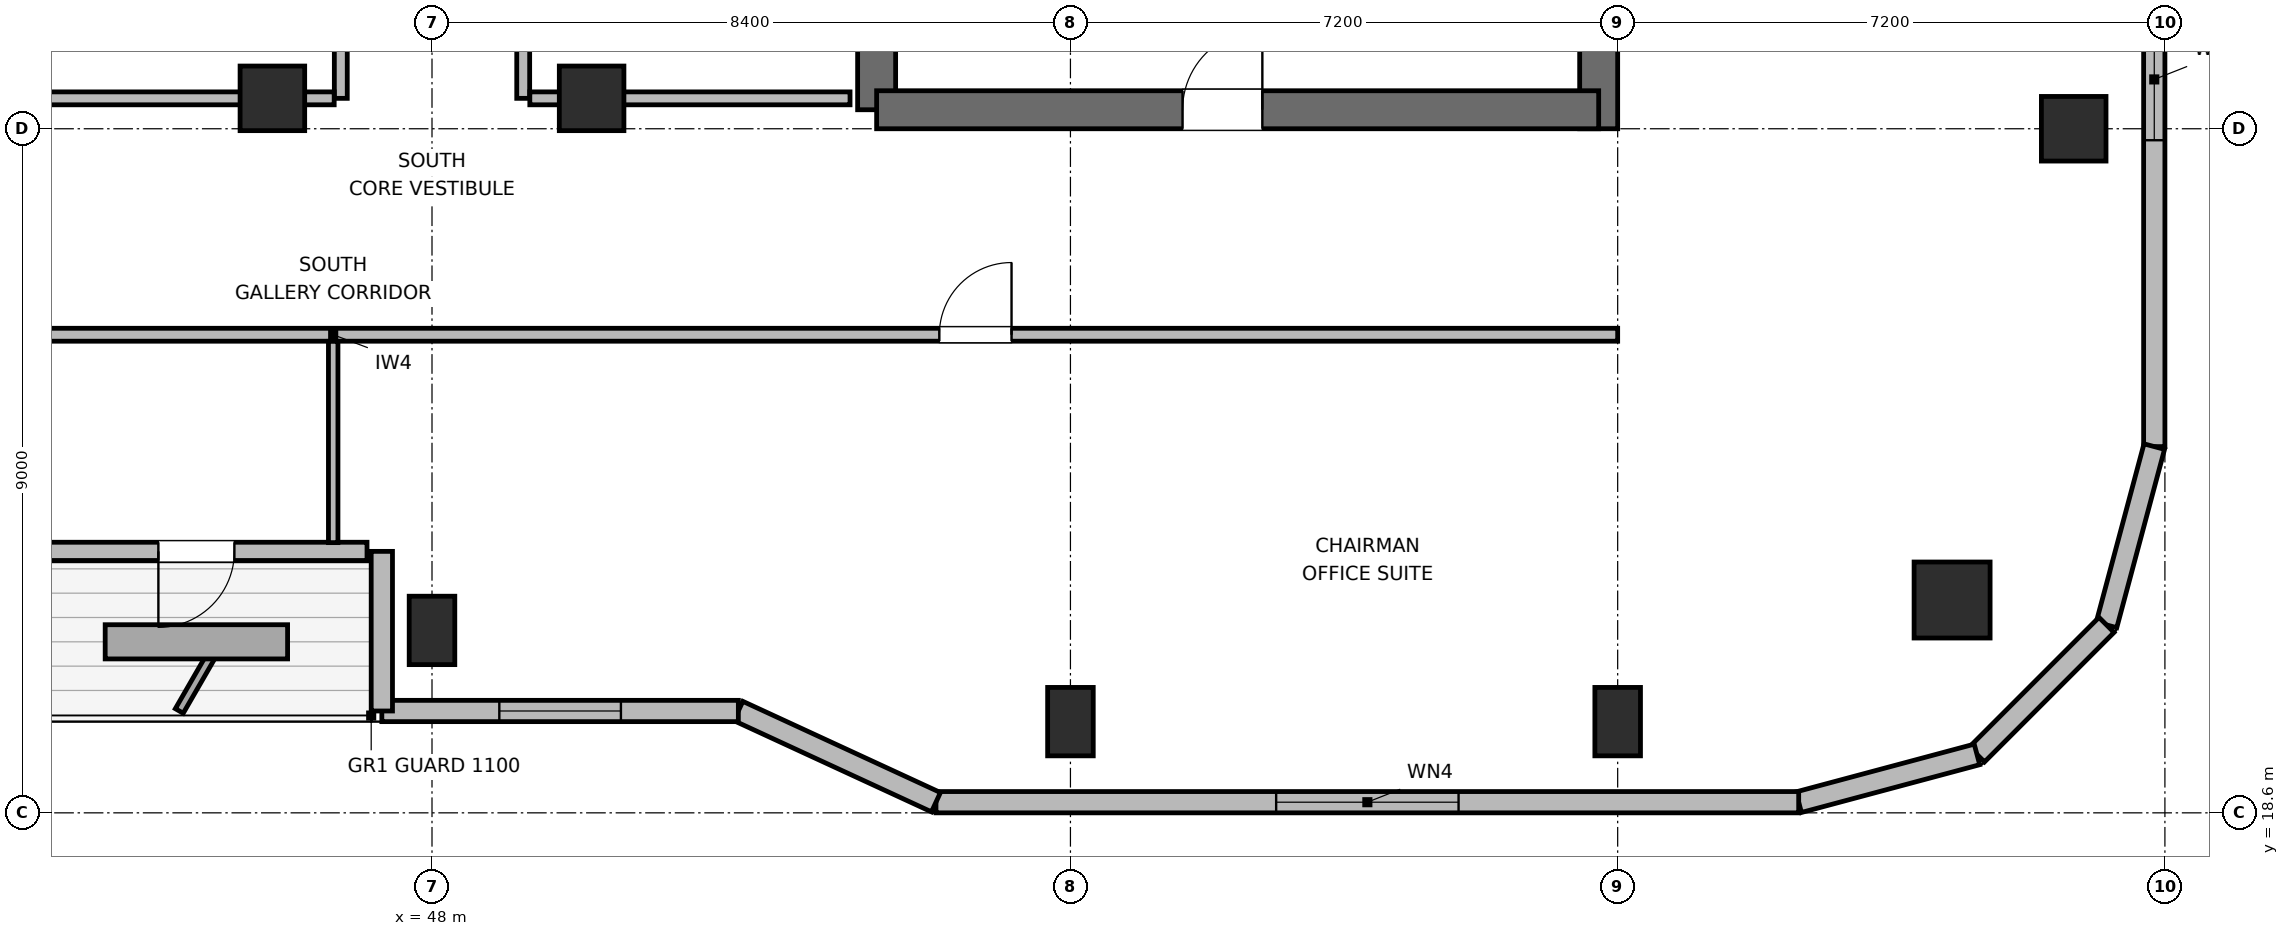
"""IFC4 building model, lengths in metres.
Left out: names, types, materials, properties, quantities, classifications, styles, units other than length and angle.
Written with IfcOpenShell. Run it as: python <this file> out.ifc"""

import sys

from ifc_helpers import new_model, si_unit, direction, frame, frame_2d, origin, origin_2d, place, context, subcontext, project, spatial, rectangle, circle, extrude, element, fill, save


model = new_model("IFC4")
c1 = context("Model", 3, precision=1e-05, world=origin(), true_north=direction((0.0, 1.0)))
c2 = subcontext(c1, "Body", "Model", "MODEL_VIEW")
j1 = project(units=[si_unit("LENGTHUNIT", "METRE"), si_unit("PLANEANGLEUNIT", "RADIAN")], contexts=[c1])
p1 = place(None, origin())
s1 = spatial("IfcSite", under=j1, at=p1, CompositionType="ELEMENT")
p2 = place(p1, origin())
s2 = spatial("IfcBuilding", under=s1, at=p2, CompositionType="ELEMENT")
p3 = place(p2, frame((0.0, 0.0, 342.0)))
s3 = spatial("IfcBuildingStorey", under=s2, at=p3, CompositionType="ELEMENT", Elevation=342.0)
p4 = place(p3, frame((53.85, 27.85, 0.0), z_axis=(0.0, 0.0, 1.0), x_axis=(0.0, 1.0, 0.0)))
e1 = element("IfcWall", 1, at=p4, inside=s3, PredefinedType="SHEAR", context=c2, shape_type="SweptSolid", body=[
    extrude(rectangle(XDim=7.95, YDim=0.5, at=frame_2d((3.975, 0.0))), origin(), (0.0, 0.0, 1.0), 4.5),
])
p5 = place(p3, frame((63.35, 27.6, 0.0), z_axis=(0.0, 0.0, 1.0), x_axis=(0.0, 1.0, 0.0)))
e2 = element("IfcWall", 2, at=p5, inside=s3, PredefinedType="SHEAR", context=c2, shape_type="SweptSolid", body=[
    extrude(rectangle(XDim=16.8, YDim=0.5, at=frame_2d((8.4, 0.0))), origin(), (0.0, 0.0, 1.0), 4.5),
])
p6 = place(p3, frame((53.85, 27.85, 0.0), z_axis=(0.0, 0.0, 1.0), x_axis=(1.0, 0.0, 0.0)))
e3 = element("IfcWall", 3, at=p6, inside=s3, PredefinedType="SHEAR", context=c2, shape_type="SweptSolid", body=[
    extrude(rectangle(XDim=9.5, YDim=0.5, at=frame_2d((4.75, 0.0))), origin(), (0.0, 0.0, 1.0), 4.5),
])
p7 = place(p6, frame((4.025, 0.0, 0.0)))
e4 = element("IfcOpeningElement", 4, at=p7, cuts=e3, PredefinedType="OPENING", context=c2, shape_type="SweptSolid", body=[
    extrude(rectangle(XDim=1.05, YDim=2.04, at=frame_2d((0.525, 1.02))), frame((0.0, 0.26, 0.0), z_axis=(0.0, -1.0, 0.0), x_axis=(1.0, 0.0, 0.0)), (0.0, 0.0, 1.0), 0.52),
])
p8 = place(p3, frame((68.0, 21.4, 0.0), z_axis=(0.0, 0.0, 1.0), x_axis=(1.0, 0.0, 0.0)))
e5 = element("IfcColumn", 5, at=p8, inside=s3, PredefinedType="COLUMN", context=c2, shape_type="SweptSolid", body=[
    extrude(circle(Radius=0.5, at=origin_2d()), origin(), (0.0, 0.0, 1.0), 4.5),
])
for number, where, z_axis, x_axis in (
    (6, (48.0, 21.0, 0.0), (0.0, 0.0, 1.0), (1.0, 0.0, 0.0)),
    (7, (56.4, 19.8, 0.0), (0.0, 0.0, 1.0), (1.0, 0.0, 0.0)),
    (8, (63.6, 19.8, 0.0), (0.0, 0.0, 1.0), (1.0, 0.0, 0.0)),
):
    element("IfcColumn", number, at=place(p3, frame(where, z_axis=z_axis, x_axis=x_axis)), inside=s3, PredefinedType="COLUMN", context=c2, shape_type="SweptSolid", body=[
        extrude(rectangle(XDim=0.6, YDim=0.9, at=origin_2d()), origin(), (0.0, 0.0, 1.0), 4.5),
    ])
for number, where, z_axis, x_axis in (
    (9, (69.6, 27.6, 0.0), (0.0, 0.0, 1.0), (1.0, 0.0, 0.0)),
    (10, (45.9, 28.0, 0.0), (0.0, 0.0, 1.0), (1.0, 0.0, 0.0)),
    (11, (50.1, 28.0, 0.0), (0.0, 0.0, 1.0), (1.0, 0.0, 0.0)),
):
    element("IfcColumn", number, at=place(p3, frame(where, z_axis=z_axis, x_axis=x_axis)), inside=s3, PredefinedType="COLUMN", context=c2, shape_type="SweptSolid", body=[
        extrude(rectangle(XDim=0.85, YDim=0.85, at=origin_2d()), origin(), (0.0, 0.0, 1.0), 4.5),
    ])
p9 = place(p3, frame((70.66, 37.66, 0.0), z_axis=(0.0, 0.0, 1.0), x_axis=(0.0, -1.0, 0.0)))
e12 = element("IfcWall", 12, at=p9, inside=s3, PredefinedType="SOLIDWALL", context=c2, shape_type="SweptSolid", body=[
    extrude(rectangle(XDim=14.241, YDim=0.28, at=frame_2d((7.121, 0.0))), origin(), (0.0, 0.0, 1.0), 4.28),
])
p10 = place(p9, frame((8.611, 0.0, 0.85)))
e13 = element("IfcOpeningElement", 13, at=p10, cuts=e12, PredefinedType="OPENING", context=c2, shape_type="SweptSolid", body=[
    extrude(rectangle(XDim=1.6, YDim=1.0, at=frame_2d((0.8, 0.5))), frame((0.0, 0.15, 0.0), z_axis=(0.0, -1.0, 0.0), x_axis=(1.0, 0.0, 0.0)), (0.0, 0.0, 1.0), 0.3),
])
p11 = place(p3, frame((70.66, 23.418, 0.0), z_axis=(0.0, 0.0, 1.0), x_axis=(-0.258751159445, -0.965944013639, 0.0)))
e14 = element("IfcWall", 14, at=p11, inside=s3, PredefinedType="SOLIDWALL", context=c2, shape_type="SweptSolid", body=[
    extrude(rectangle(XDim=2.429, YDim=0.28, at=frame_2d((1.214, 0.0))), origin(), (0.0, 0.0, 1.0), 4.28),
])
p12 = place(p3, frame((70.031, 21.073, 0.0), z_axis=(0.0, 0.0, 1.0), x_axis=(-0.707106781187, -0.707106781187, 0.0)))
e15 = element("IfcWall", 15, at=p12, inside=s3, PredefinedType="SOLIDWALL", context=c2, shape_type="SweptSolid", body=[
    extrude(rectangle(XDim=2.41, YDim=0.28, at=frame_2d((1.205, 0.0))), origin(), (0.0, 0.0, 1.0), 4.28),
])
p13 = place(p3, frame((68.327, 19.368, 0.0), z_axis=(0.0, 0.0, 1.0), x_axis=(-0.965937282298, -0.25877628691, 0.0)))
e16 = element("IfcWall", 16, at=p13, inside=s3, PredefinedType="SOLIDWALL", context=c2, shape_type="SweptSolid", body=[
    extrude(rectangle(XDim=2.428, YDim=0.28, at=frame_2d((1.214, 0.0))), origin(), (0.0, 0.0, 1.0), 4.28),
])
p14 = place(p3, frame((65.982, 18.74, 0.0), z_axis=(0.0, 0.0, 1.0), x_axis=(-1.0, 0.0, 0.0)))
e17 = element("IfcWall", 17, at=p14, inside=s3, PredefinedType="SOLIDWALL", context=c2, shape_type="SweptSolid", body=[
    extrude(rectangle(XDim=11.351, YDim=0.28, at=frame_2d((5.676, 0.0))), origin(), (0.0, 0.0, 1.0), 4.28),
])
p15 = place(p14, frame((4.475, 0.0, 0.85)))
e18 = element("IfcOpeningElement", 18, at=p15, cuts=e17, PredefinedType="OPENING", context=c2, shape_type="SweptSolid", body=[
    extrude(rectangle(XDim=2.4, YDim=1.15, at=frame_2d((1.2, 0.575))), frame((0.0, 0.15, 0.0), z_axis=(0.0, -1.0, 0.0), x_axis=(1.0, 0.0, 0.0)), (0.0, 0.0, 1.0), 0.3),
])
p16 = place(p3, frame((54.631, 18.74, 0.0), z_axis=(0.0, 0.0, 1.0), x_axis=(-0.907956889006, 0.419063584324, 0.0)))
e19 = element("IfcWall", 19, at=p16, inside=s3, PredefinedType="SOLIDWALL", context=c2, shape_type="SweptSolid", body=[
    extrude(rectangle(XDim=2.864, YDim=0.28, at=frame_2d((1.432, 0.0))), origin(), (0.0, 0.0, 1.0), 2.865),
])
p17 = place(p3, frame((52.031, 19.94, 0.0), z_axis=(0.0, 0.0, 1.0), x_axis=(-1.0, 0.0, 0.0)))
e20 = element("IfcWall", 20, at=p17, inside=s3, PredefinedType="SOLIDWALL", context=c2, shape_type="SweptSolid", body=[
    extrude(rectangle(XDim=4.691, YDim=0.28, at=frame_2d((2.345, 0.0))), origin(), (0.0, 0.0, 1.0), 2.865),
])
p18 = place(p17, frame((1.545, 0.0, 0.85)))
e21 = element("IfcOpeningElement", 21, at=p18, cuts=e20, PredefinedType="OPENING", context=c2, shape_type="SweptSolid", body=[
    extrude(rectangle(XDim=1.6, YDim=1.0, at=frame_2d((0.8, 0.5))), frame((0.0, 0.15, 0.0), z_axis=(0.0, -1.0, 0.0), x_axis=(1.0, 0.0, 0.0)), (0.0, 0.0, 1.0), 0.3),
])
p19 = place(p3, frame((47.34, 19.94, 0.0), z_axis=(0.0, 0.0, 1.0), x_axis=(0.0, 1.0, 0.0)))
e22 = element("IfcWall", 22, at=p19, inside=s3, PredefinedType="SOLIDWALL", context=c2, shape_type="SweptSolid", body=[
    extrude(rectangle(XDim=2.1, YDim=0.28, at=frame_2d((1.05, 0.0))), origin(), (0.0, 0.0, 1.0), 2.865),
])
p20 = place(p3, frame((47.145, 22.04, 0.0), z_axis=(0.0, 0.0, 1.0), x_axis=(-1.0, 0.0, 0.0)))
e23 = element("IfcWall", 23, at=p20, inside=s3, PredefinedType="SOLIDWALL", context=c2, shape_type="SweptSolid", body=[
    extrude(rectangle(XDim=4.49, YDim=0.24, at=frame_2d((2.245, 0.0))), origin(), (0.0, 0.0, 1.0), 4.28),
])
p21 = place(p20, frame((1.745, 0.0, 0.0)))
e24 = element("IfcOpeningElement", 24, at=p21, cuts=e23, PredefinedType="OPENING", context=c2, shape_type="SweptSolid", body=[
    extrude(rectangle(XDim=1.0, YDim=2.02, at=frame_2d((0.5, 1.01))), frame((0.0, 0.13, 0.0), z_axis=(0.0, -1.0, 0.0), x_axis=(1.0, 0.0, 0.0)), (0.0, 0.0, 1.0), 0.26),
])
p22 = place(p3, frame((46.8, 28.0, 0.0), z_axis=(0.0, 0.0, 1.0), x_axis=(0.0, 1.0, 0.0)))
e25 = element("IfcWall", 25, at=p22, inside=s3, PredefinedType="PARTITIONING", context=c2, shape_type="SweptSolid", body=[
    extrude(rectangle(XDim=4.5, YDim=0.17, at=frame_2d((2.25, 0.0))), origin(), (0.0, 0.0, 1.0), 4.28),
])
p23 = place(p22, frame((0.675, 0.0, 0.0)))
e26 = element("IfcOpeningElement", 26, at=p23, cuts=e25, PredefinedType="OPENING", context=c2, shape_type="SweptSolid", body=[
    extrude(rectangle(XDim=0.9, YDim=2.02, at=frame_2d((0.45, 1.01))), frame((0.0, 0.095, 0.0), z_axis=(0.0, -1.0, 0.0), x_axis=(1.0, 0.0, 0.0)), (0.0, 0.0, 1.0), 0.19),
])
p24 = place(p22, frame((2.925, 0.0, 0.0)))
e27 = element("IfcOpeningElement", 27, at=p24, cuts=e25, PredefinedType="OPENING", context=c2, shape_type="SweptSolid", body=[
    extrude(rectangle(XDim=0.9, YDim=2.02, at=frame_2d((0.45, 1.01))), frame((0.0, 0.095, 0.0), z_axis=(0.0, -1.0, 0.0), x_axis=(1.0, 0.0, 0.0)), (0.0, 0.0, 1.0), 0.19),
])
p25 = place(p3, frame((42.5, 28.0, 0.0), z_axis=(0.0, 0.0, 1.0), x_axis=(1.0, 0.0, 0.0)))
e28 = element("IfcWall", 28, at=p25, inside=s3, PredefinedType="PARTITIONING", context=c2, shape_type="SweptSolid", body=[
    extrude(rectangle(XDim=4.213, YDim=0.17, at=frame_2d((2.106, 0.0))), origin(), (0.0, 0.0, 1.0), 3.365),
])
p26 = place(p3, frame((49.2, 28.0, 0.0), z_axis=(0.0, 0.0, 1.0), x_axis=(0.0, 1.0, 0.0)))
e29 = element("IfcWall", 29, at=p26, inside=s3, PredefinedType="PARTITIONING", context=c2, shape_type="SweptSolid", body=[
    extrude(rectangle(XDim=4.5, YDim=0.17, at=frame_2d((2.25, 0.0))), origin(), (0.0, 0.0, 1.0), 4.28),
])
p27 = place(p26, frame((1.8, 0.0, 0.0)))
e30 = element("IfcOpeningElement", 30, at=p27, cuts=e29, PredefinedType="OPENING", context=c2, shape_type="SweptSolid", body=[
    extrude(rectangle(XDim=0.9, YDim=2.02, at=frame_2d((0.45, 1.01))), frame((0.0, 0.095, 0.0), z_axis=(0.0, -1.0, 0.0), x_axis=(1.0, 0.0, 0.0)), (0.0, 0.0, 1.0), 0.19),
])
p28 = place(p3, frame((49.287, 28.0, 0.0), z_axis=(0.0, 0.0, 1.0), x_axis=(1.0, 0.0, 0.0)))
e31 = element("IfcWall", 31, at=p28, inside=s3, PredefinedType="PARTITIONING", context=c2, shape_type="SweptSolid", body=[
    extrude(rectangle(XDim=4.213, YDim=0.17, at=frame_2d((2.106, 0.0))), origin(), (0.0, 0.0, 1.0), 3.365),
])
p29 = place(p3, frame((29.8, 24.89, 0.0), z_axis=(0.0, 0.0, 1.0), x_axis=(1.0, 0.0, 0.0)))
e32 = element("IfcWall", 32, at=p29, inside=s3, PredefinedType="PARTITIONING", context=c2, shape_type="SweptSolid", body=[
    extrude(rectangle(XDim=33.8, YDim=0.17, at=frame_2d((16.9, 0.0))), origin(), (0.0, 0.0, 1.0), 4.28),
])
p30 = place(p29, frame((7.975, 0.0, 0.0)))
e33 = element("IfcOpeningElement", 33, at=p30, cuts=e32, PredefinedType="OPENING", context=c2, shape_type="SweptSolid", body=[
    extrude(rectangle(XDim=0.95, YDim=2.04, at=frame_2d((0.475, 1.02))), frame((0.0, 0.095, 0.0), z_axis=(0.0, -1.0, 0.0), x_axis=(1.0, 0.0, 0.0)), (0.0, 0.0, 1.0), 0.19),
])
p31 = place(p29, frame((24.875, 0.0, 0.0)))
e34 = element("IfcOpeningElement", 34, at=p31, cuts=e32, PredefinedType="OPENING", context=c2, shape_type="SweptSolid", body=[
    extrude(rectangle(XDim=0.95, YDim=2.04, at=frame_2d((0.475, 1.02))), frame((0.0, 0.095, 0.0), z_axis=(0.0, -1.0, 0.0), x_axis=(1.0, 0.0, 0.0)), (0.0, 0.0, 1.0), 0.19),
])
p32 = place(p3, frame((46.7, 22.155, 0.0), z_axis=(0.0, 0.0, 1.0), x_axis=(0.0, 1.0, 0.0)))
e35 = element("IfcWall", 35, at=p32, inside=s3, PredefinedType="PARTITIONING", context=c2, shape_type="SweptSolid", body=[
    extrude(rectangle(XDim=2.648, YDim=0.125, at=frame_2d((1.324, 0.0))), origin(), (0.0, 0.0, 1.0), 4.28),
])
p33 = place(p10, origin())
e36 = element("IfcWindow", 36, at=p33, inside=s3, PartitioningType="SINGLE_PANEL", PredefinedType="WINDOW", context=c2, shape_type="SweptSolid", body=[
    extrude(rectangle(XDim=1.6, YDim=1.0, at=frame_2d((0.8, 0.5))), frame((0.0, 0.03, 0.0), z_axis=(0.0, -1.0, 0.0), x_axis=(1.0, 0.0, 0.0)), (0.0, 0.0, 1.0), 0.06),
])
fill(e13, e36)
p34 = place(p15, origin())
e37 = element("IfcWindow", 37, at=p34, inside=s3, PartitioningType="SINGLE_PANEL", PredefinedType="WINDOW", context=c2, shape_type="SweptSolid", body=[
    extrude(rectangle(XDim=2.4, YDim=1.15, at=frame_2d((1.2, 0.575))), frame((0.0, 0.03, 0.0), z_axis=(0.0, -1.0, 0.0), x_axis=(1.0, 0.0, 0.0)), (0.0, 0.0, 1.0), 0.06),
])
fill(e18, e37)
p35 = place(p18, origin())
e38 = element("IfcWindow", 38, at=p35, inside=s3, PartitioningType="SINGLE_PANEL", PredefinedType="WINDOW", context=c2, shape_type="SweptSolid", body=[
    extrude(rectangle(XDim=1.6, YDim=1.0, at=frame_2d((0.8, 0.5))), frame((0.0, 0.03, 0.0), z_axis=(0.0, -1.0, 0.0), x_axis=(1.0, 0.0, 0.0)), (0.0, 0.0, 1.0), 0.06),
])
fill(e21, e38)
p36 = place(p21, origin())
e39 = element("IfcDoor", 39, at=p36, inside=s3, OperationType="SINGLE_SWING_RIGHT", PredefinedType="DOOR", context=c2, shape_type="SweptSolid", body=[
    extrude(rectangle(XDim=1.0, YDim=2.02, at=frame_2d((0.5, 1.01))), frame((0.0, 0.025, 0.0), z_axis=(0.0, -1.0, 0.0), x_axis=(1.0, 0.0, 0.0)), (0.0, 0.0, 1.0), 0.05),
])
fill(e24, e39)
p37 = place(p7, origin())
e40 = element("IfcDoor", 40, at=p37, inside=s3, OperationType="SINGLE_SWING_RIGHT", PredefinedType="DOOR", context=c2, shape_type="SweptSolid", body=[
    extrude(rectangle(XDim=1.05, YDim=2.04, at=frame_2d((0.525, 1.02))), frame((0.0, 0.025, 0.0), z_axis=(0.0, -1.0, 0.0), x_axis=(1.0, 0.0, 0.0)), (0.0, 0.0, 1.0), 0.05),
])
fill(e4, e40)
p38 = place(p31, origin())
e41 = element("IfcDoor", 41, at=p38, inside=s3, OperationType="SINGLE_SWING_RIGHT", PredefinedType="DOOR", context=c2, shape_type="SweptSolid", body=[
    extrude(rectangle(XDim=0.95, YDim=2.04, at=frame_2d((0.475, 1.02))), frame((0.0, 0.025, 0.0), z_axis=(0.0, -1.0, 0.0), x_axis=(1.0, 0.0, 0.0)), (0.0, 0.0, 1.0), 0.05),
])
fill(e34, e41)
save(model, sys.argv[1])
